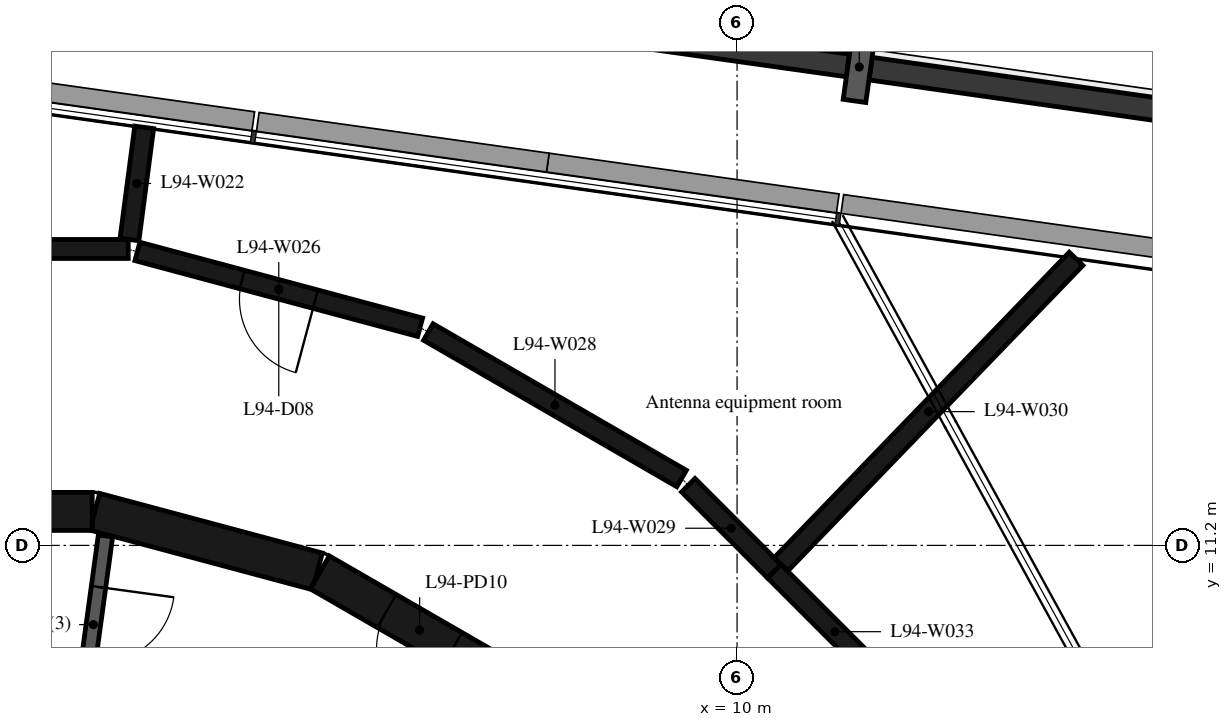
"""IFC4 building model, lengths in metres.
Left out: names, types, materials, properties, quantities, classifications, styles, units other than length and angle.
Written with IfcOpenShell. Run it as: python <this file> out.ifc"""

import sys

from ifc_helpers import new_model, si_unit, direction, frame, frame_2d, origin, origin_2d, place, context, subcontext, project, spatial, rectangle, i_section, extrude, element, fill, save


model = new_model("IFC4")
c1 = context("Model", 3, precision=1e-05, world=origin(), true_north=direction((0.0, 1.0)))
c2 = subcontext(c1, "Body", "Model", "MODEL_VIEW")
j1 = project(units=[si_unit("LENGTHUNIT", "METRE"), si_unit("PLANEANGLEUNIT", "RADIAN")], contexts=[c1])
p1 = place(None, origin())
s1 = spatial("IfcSite", under=j1, at=p1, CompositionType="ELEMENT")
p2 = place(p1, origin())
s2 = spatial("IfcBuilding", under=s1, at=p2, CompositionType="ELEMENT")
p3 = place(p2, frame((0.0, 0.0, 366.2)))
s3 = spatial("IfcBuildingStorey", under=s2, at=p3, CompositionType="ELEMENT", Elevation=366.2)
p4 = place(p3, frame((11.607, 17.493, -0.38), z_axis=(0.0, 0.0, 1.0), x_axis=(0.990268081324, -0.139173011432, 0.0)))
e1 = element("IfcColumn", 1, at=p4, inside=s3, PredefinedType="COLUMN", context=c2, shape_type="SweptSolid", body=[
    extrude(i_section(OverallWidth=0.3, OverallDepth=0.9, WebThickness=0.019, FlangeThickness=0.035, FilletRadius=0.03, at=origin_2d()), origin(), (0.0, 0.0, 1.0), 5.58),
])
p5 = place(p3, frame((18.227, 16.553, 5.2), z_axis=(0.0, 0.0, 1.0), x_axis=(-0.990064967567, 0.140610668148, 0.0)))
e2 = element("IfcWall", 2, at=p5, inside=s3, PredefinedType="PARAPET", context=c2, shape_type="SweptSolid", body=[
    extrude(rectangle(XDim=6.535, YDim=0.3, at=frame_2d((3.268, 0.0))), origin(), (0.0, 0.0, 1.0), 0.58),
])
p6 = place(p3, frame((11.459, 17.514, 5.2), z_axis=(0.0, 0.0, 1.0), x_axis=(-0.990271933282, 0.139145600559, 0.0)))
e3 = element("IfcWall", 3, at=p6, inside=s3, PredefinedType="PARAPET", context=c2, shape_type="SweptSolid", body=[
    extrude(rectangle(XDim=7.466, YDim=0.3, at=frame_2d((3.733, 0.0))), origin(), (0.0, 0.0, 1.0), 0.58),
])
p7 = place(p3, frame((7.137, 9.329, 0.0), z_axis=(0.0, 0.0, 1.0), x_axis=(-0.865975092491, 0.500087131594, 0.0)))
e4 = element("IfcWall", 4, at=p7, inside=s3, PredefinedType="SHEAR", context=c2, shape_type="SweptSolid", body=[
    extrude(rectangle(XDim=3.033, YDim=0.5, at=frame_2d((1.516, 0.0))), origin(), (0.0, 0.0, 1.0), 4.8),
])
p8 = place(p7, frame((1.016, 0.0, 0.0)))
e5 = element("IfcOpeningElement", 5, at=p8, cuts=e4, PredefinedType="OPENING", context=c2, shape_type="SweptSolid", body=[
    extrude(rectangle(XDim=1.0, YDim=2.4, at=frame_2d((0.5, 1.2))), frame((0.0, 0.26, 0.0), z_axis=(0.0, -1.0, 0.0), x_axis=(1.0, 0.0, 0.0)), (0.0, 0.0, 1.0), 0.52),
])
for number, where, z_axis, x_axis in (
    (6, (4.479, 10.858, 0.0), (0.0, 0.0, 1.0), (-0.966, 0.259, 0.0)),
    (7, (1.516, 11.647, 0.0), (0.0, 0.0, 1.0), (-1.0, 0.0, 0.0)),
):
    element("IfcWall", number, at=place(p3, frame(where, z_axis=z_axis, x_axis=x_axis)), inside=s3, PredefinedType="SHEAR", context=c2, shape_type="SweptSolid", body=[
        extrude(rectangle(XDim=3.033, YDim=0.5, at=frame_2d((1.516, 0.0))), origin(), (0.0, 0.0, 1.0), 4.8),
    ])
p9 = place(p3, frame((1.691, 11.326, 0.0), z_axis=(0.0, 0.0, 1.0), x_axis=(-0.135344253201, -0.990798633994, 0.0)))
e8 = element("IfcWall", 8, at=p9, inside=s3, PredefinedType="PARTITIONING", context=c2, shape_type="SweptSolid", body=[
    extrude(rectangle(XDim=2.358, YDim=0.19, at=frame_2d((1.179, 0.0))), origin(), (0.0, 0.0, 1.0), 4.8),
])
p10 = place(p9, frame((0.679, 0.0, 0.0)))
e9 = element("IfcOpeningElement", 9, at=p10, cuts=e8, PredefinedType="OPENING", context=c2, shape_type="SweptSolid", body=[
    extrude(rectangle(XDim=1.0, YDim=2.4, at=frame_2d((0.5, 1.2))), frame((0.0, 0.105, 0.0), z_axis=(0.0, -1.0, 0.0), x_axis=(1.0, 0.0, 0.0)), (0.0, 0.0, 1.0), 0.21),
])
p11 = place(p3, frame((1.99, 15.1, 0.0), z_axis=(0.0, 0.0, 1.0), x_axis=(-1.0, 0.0, 0.0)))
e10 = element("IfcWall", 10, at=p11, inside=s3, PredefinedType="PARTITIONING", context=c2, shape_type="SweptSolid", body=[
    extrude(rectangle(XDim=3.855, YDim=0.25, at=frame_2d((1.927, 0.0))), origin(), (0.0, 0.0, 1.0), 4.8),
])
p12 = place(p11, frame((1.427, 0.0, 0.0)))
e11 = element("IfcOpeningElement", 11, at=p12, cuts=e10, PredefinedType="OPENING", context=c2, shape_type="SweptSolid", body=[
    extrude(rectangle(XDim=1.0, YDim=2.1, at=frame_2d((0.5, 1.05))), frame((0.0, 0.135, 0.0), z_axis=(0.0, -1.0, 0.0), x_axis=(1.0, 0.0, 0.0)), (0.0, 0.0, 1.0), 0.27),
])
p13 = place(p3, frame((2.006, 15.224, 0.0), z_axis=(0.0, 0.0, 1.0), x_axis=(0.13004725163, 0.991507797419, 0.0)))
e12 = element("IfcWall", 12, at=p13, inside=s3, PredefinedType="PARTITIONING", context=c2, shape_type="SweptSolid", body=[
    extrude(rectangle(XDim=1.489, YDim=0.25, at=frame_2d((0.744, 0.0))), origin(), (0.0, 0.0, 1.0), 4.8),
])
p14 = place(p3, frame((5.83, 14.07, 0.0), z_axis=(0.0, 0.0, 1.0), x_axis=(-0.965861411942, 0.259059323171, 0.0)))
e13 = element("IfcWall", 13, at=p14, inside=s3, PredefinedType="PARTITIONING", context=c2, shape_type="SweptSolid", body=[
    extrude(rectangle(XDim=3.851, YDim=0.25, at=frame_2d((1.925, 0.0))), origin(), (0.0, 0.0, 1.0), 4.8),
])
p15 = place(p14, frame((1.425, 0.0, 0.0)))
e14 = element("IfcOpeningElement", 14, at=p15, cuts=e13, PredefinedType="OPENING", context=c2, shape_type="SweptSolid", body=[
    extrude(rectangle(XDim=1.0, YDim=2.1, at=frame_2d((0.5, 1.05))), frame((0.0, 0.135, 0.0), z_axis=(0.0, -1.0, 0.0), x_axis=(1.0, 0.0, 0.0)), (0.0, 0.0, 1.0), 0.27),
])
p16 = place(p3, frame((9.27, 12.08, 0.0), z_axis=(0.0, 0.0, 1.0), x_axis=(-0.865615852585, 0.500708693508, 0.0)))
e15 = element("IfcWall", 15, at=p16, inside=s3, PredefinedType="PARTITIONING", context=c2, shape_type="SweptSolid", body=[
    extrude(rectangle(XDim=3.849, YDim=0.25, at=frame_2d((1.925, 0.0))), origin(), (0.0, 0.0, 1.0), 4.8),
])
p17 = place(p3, frame((10.49, 10.86, 0.0), z_axis=(0.0, 0.0, 1.0), x_axis=(-0.707106781187, 0.707106781187, 0.0)))
e16 = element("IfcWall", 16, at=p17, inside=s3, PredefinedType="PARTITIONING", context=c2, shape_type="SweptSolid", body=[
    extrude(rectangle(XDim=1.6, YDim=0.25, at=frame_2d((0.8, 0.0))), origin(), (0.0, 0.0, 1.0), 4.8),
])
p18 = place(p3, frame((10.577, 10.95, 0.0), z_axis=(0.0, 0.0, 1.0), x_axis=(0.694748067219, 0.719253170376, 0.0)))
e17 = element("IfcWall", 17, at=p18, inside=s3, PredefinedType="PARTITIONING", context=c2, shape_type="SweptSolid", body=[
    extrude(rectangle(XDim=5.589, YDim=0.25, at=frame_2d((2.794, 0.0))), origin(), (0.0, 0.0, 1.0), 4.8),
])
p19 = place(p3, frame((12.08, 9.27, 0.0), z_axis=(0.0, 0.0, 1.0), x_axis=(-0.707106781187, 0.707106781187, 0.0)))
e18 = element("IfcWall", 18, at=p19, inside=s3, PredefinedType="PARTITIONING", context=c2, shape_type="SweptSolid", body=[
    extrude(rectangle(XDim=2.249, YDim=0.25, at=frame_2d((1.125, 0.0))), origin(), (0.0, 0.0, 1.0), 4.8),
])
p20 = place(p10, origin())
e19 = element("IfcDoor", 19, at=p20, inside=s3, OperationType="SINGLE_SWING_LEFT", PredefinedType="DOOR", context=c2, shape_type="SweptSolid", body=[
    extrude(rectangle(XDim=1.0, YDim=2.4, at=frame_2d((0.5, 1.2))), frame((0.0, 0.025, 0.0), z_axis=(0.0, -1.0, 0.0), x_axis=(1.0, 0.0, 0.0)), (0.0, 0.0, 1.0), 0.05),
])
fill(e9, e19)
p21 = place(p8, origin())
e20 = element("IfcDoor", 20, at=p21, inside=s3, OperationType="SINGLE_SWING_LEFT", PredefinedType="DOOR", context=c2, shape_type="SweptSolid", body=[
    extrude(rectangle(XDim=1.0, YDim=2.4, at=frame_2d((0.5, 1.2))), frame((0.0, 0.025, 0.0), z_axis=(0.0, -1.0, 0.0), x_axis=(1.0, 0.0, 0.0)), (0.0, 0.0, 1.0), 0.05),
])
fill(e5, e20)
p22 = place(p15, origin())
e21 = element("IfcDoor", 21, at=p22, inside=s3, OperationType="SINGLE_SWING_LEFT", PredefinedType="DOOR", context=c2, shape_type="SweptSolid", body=[
    extrude(rectangle(XDim=1.0, YDim=2.1, at=frame_2d((0.5, 1.05))), frame((0.0, 0.025, 0.0), z_axis=(0.0, -1.0, 0.0), x_axis=(1.0, 0.0, 0.0)), (0.0, 0.0, 1.0), 0.05),
])
fill(e14, e21)
save(model, sys.argv[1])
